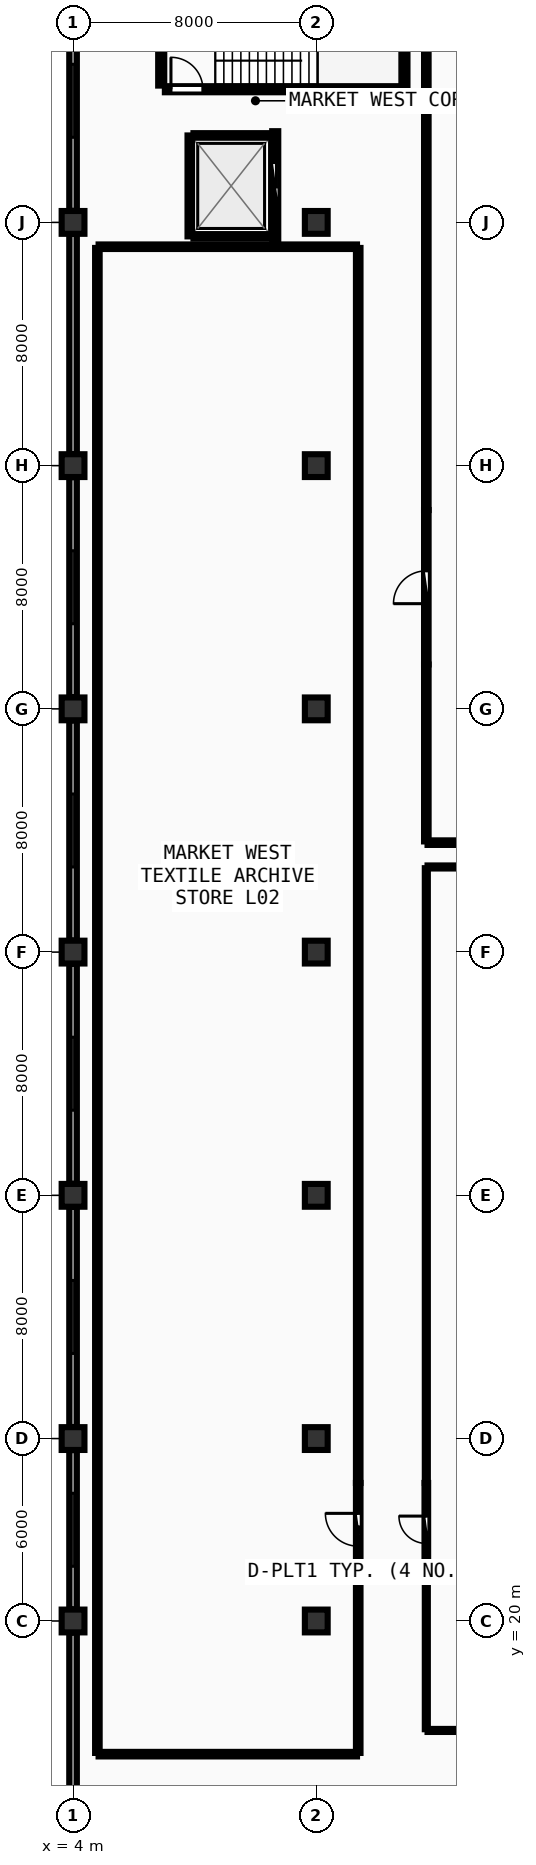
"""IFC4 building model, lengths in metres.
Left out: names, types, materials, properties, quantities, classifications, styles, units other than length and angle.
Written with IfcOpenShell. Run it as: python <this file> out.ifc"""

import sys

from ifc_helpers import new_model, si_unit, direction, frame, frame_2d, origin, origin_2d, place, context, subcontext, project, spatial, rectangle, extrude, element, fill, save


model = new_model("IFC4")
c1 = context("Model", 3, precision=1e-05, world=origin(), true_north=direction((0.0, 1.0)))
c2 = subcontext(c1, "Body", "Model", "MODEL_VIEW")
j1 = project(units=[si_unit("LENGTHUNIT", "METRE"), si_unit("PLANEANGLEUNIT", "RADIAN")], contexts=[c1])
p1 = place(None, origin())
s1 = spatial("IfcSite", under=j1, at=p1, CompositionType="ELEMENT")
p2 = place(p1, origin())
s2 = spatial("IfcBuilding", under=s1, at=p2, CompositionType="ELEMENT")
p3 = place(p2, frame((0.0, 0.0, 9.0)))
s3 = spatial("IfcBuildingStorey", under=s2, at=p3, CompositionType="ELEMENT", Elevation=9.0)
for number, where, z_axis, x_axis in (
    (1, (4.0, 20.0, 0.0), (0.0, 0.0, 1.0), (1.0, 0.0, 0.0)),
    (2, (4.0, 26.0, 0.0), (0.0, 0.0, 1.0), (1.0, 0.0, 0.0)),
    (3, (4.0, 34.0, 0.0), (0.0, 0.0, 1.0), (1.0, 0.0, 0.0)),
    (4, (4.0, 42.0, 0.0), (0.0, 0.0, 1.0), (1.0, 0.0, 0.0)),
    (5, (4.0, 50.0, 0.0), (0.0, 0.0, 1.0), (1.0, 0.0, 0.0)),
    (6, (4.0, 58.0, 0.0), (0.0, 0.0, 1.0), (1.0, 0.0, 0.0)),
    (7, (4.0, 66.0, 0.0), (0.0, 0.0, 1.0), (1.0, 0.0, 0.0)),
    (8, (12.0, 20.0, 0.0), (0.0, 0.0, 1.0), (1.0, 0.0, 0.0)),
    (9, (12.0, 26.0, 0.0), (0.0, 0.0, 1.0), (1.0, 0.0, 0.0)),
    (10, (12.0, 34.0, 0.0), (0.0, 0.0, 1.0), (1.0, 0.0, 0.0)),
    (11, (12.0, 42.0, 0.0), (0.0, 0.0, 1.0), (1.0, 0.0, 0.0)),
    (12, (12.0, 50.0, 0.0), (0.0, 0.0, 1.0), (1.0, 0.0, 0.0)),
    (13, (12.0, 58.0, 0.0), (0.0, 0.0, 1.0), (1.0, 0.0, 0.0)),
    (14, (12.0, 66.0, 0.0), (0.0, 0.0, 1.0), (1.0, 0.0, 0.0)),
):
    element("IfcColumn", number, at=place(p3, frame(where, z_axis=z_axis, x_axis=x_axis)), inside=s3, PredefinedType="COLUMN", context=c2, shape_type="SweptSolid", body=[
        extrude(rectangle(XDim=0.75, YDim=0.75, at=origin_2d()), origin(), (0.0, 0.0, 1.0), 4.5),
    ])
p4 = place(p3, frame((4.0, 73.62, 0.0), z_axis=(0.0, 0.0, 1.0), x_axis=(0.0, -1.0, 0.0)))
e15 = element("IfcWall", 15, at=p4, inside=s3, PredefinedType="SOLIDWALL", context=c2, shape_type="SweptSolid", body=[
    extrude(rectangle(XDim=7.24, YDim=0.25, at=frame_2d((3.62, 0.0))), origin(), (0.0, 0.0, 1.0), 3.42),
])
p5 = place(p4, frame((2.42, 0.0, 0.95)))
e16 = element("IfcOpeningElement", 16, at=p5, cuts=e15, PredefinedType="OPENING", context=c2, shape_type="SweptSolid", body=[
    extrude(rectangle(XDim=2.4, YDim=1.65, at=frame_2d((1.2, 0.825))), frame((0.0, 0.135, 0.0), z_axis=(0.0, -1.0, 0.0), x_axis=(1.0, 0.0, 0.0)), (0.0, 0.0, 1.0), 0.27),
])
p6 = place(p3, frame((4.0, 65.62, 0.0), z_axis=(0.0, 0.0, 1.0), x_axis=(0.0, -1.0, 0.0)))
e17 = element("IfcWall", 17, at=p6, inside=s3, PredefinedType="SOLIDWALL", context=c2, shape_type="SweptSolid", body=[
    extrude(rectangle(XDim=7.24, YDim=0.25, at=frame_2d((3.62, 0.0))), origin(), (0.0, 0.0, 1.0), 3.42),
])
p7 = place(p3, frame((4.0, 57.62, 0.0), z_axis=(0.0, 0.0, 1.0), x_axis=(0.0, -1.0, 0.0)))
e18 = element("IfcWall", 18, at=p7, inside=s3, PredefinedType="SOLIDWALL", context=c2, shape_type="SweptSolid", body=[
    extrude(rectangle(XDim=7.24, YDim=0.25, at=frame_2d((3.62, 0.0))), origin(), (0.0, 0.0, 1.0), 3.42),
])
p8 = place(p7, frame((2.42, 0.0, 0.95)))
e19 = element("IfcOpeningElement", 19, at=p8, cuts=e18, PredefinedType="OPENING", context=c2, shape_type="SweptSolid", body=[
    extrude(rectangle(XDim=2.4, YDim=1.65, at=frame_2d((1.2, 0.825))), frame((0.0, 0.135, 0.0), z_axis=(0.0, -1.0, 0.0), x_axis=(1.0, 0.0, 0.0)), (0.0, 0.0, 1.0), 0.27),
])
p9 = place(p3, frame((4.0, 49.62, 0.0), z_axis=(0.0, 0.0, 1.0), x_axis=(0.0, -1.0, 0.0)))
e20 = element("IfcWall", 20, at=p9, inside=s3, PredefinedType="SOLIDWALL", context=c2, shape_type="SweptSolid", body=[
    extrude(rectangle(XDim=7.24, YDim=0.25, at=frame_2d((3.62, 0.0))), origin(), (0.0, 0.0, 1.0), 3.42),
])
p10 = place(p9, frame((2.42, 0.0, 0.95)))
e21 = element("IfcOpeningElement", 21, at=p10, cuts=e20, PredefinedType="OPENING", context=c2, shape_type="SweptSolid", body=[
    extrude(rectangle(XDim=2.4, YDim=1.65, at=frame_2d((1.2, 0.825))), frame((0.0, 0.135, 0.0), z_axis=(0.0, -1.0, 0.0), x_axis=(1.0, 0.0, 0.0)), (0.0, 0.0, 1.0), 0.27),
])
p11 = place(p3, frame((4.0, 41.62, 0.0), z_axis=(0.0, 0.0, 1.0), x_axis=(0.0, -1.0, 0.0)))
e22 = element("IfcWall", 22, at=p11, inside=s3, PredefinedType="SOLIDWALL", context=c2, shape_type="SweptSolid", body=[
    extrude(rectangle(XDim=7.24, YDim=0.25, at=frame_2d((3.62, 0.0))), origin(), (0.0, 0.0, 1.0), 3.42),
])
p12 = place(p11, frame((2.42, 0.0, 0.95)))
e23 = element("IfcOpeningElement", 23, at=p12, cuts=e22, PredefinedType="OPENING", context=c2, shape_type="SweptSolid", body=[
    extrude(rectangle(XDim=2.4, YDim=1.65, at=frame_2d((1.2, 0.825))), frame((0.0, 0.135, 0.0), z_axis=(0.0, -1.0, 0.0), x_axis=(1.0, 0.0, 0.0)), (0.0, 0.0, 1.0), 0.27),
])
p13 = place(p3, frame((4.0, 33.62, 0.0), z_axis=(0.0, 0.0, 1.0), x_axis=(0.0, -1.0, 0.0)))
e24 = element("IfcWall", 24, at=p13, inside=s3, PredefinedType="SOLIDWALL", context=c2, shape_type="SweptSolid", body=[
    extrude(rectangle(XDim=7.24, YDim=0.25, at=frame_2d((3.62, 0.0))), origin(), (0.0, 0.0, 1.0), 3.42),
])
p14 = place(p13, frame((2.42, 0.0, 0.95)))
e25 = element("IfcOpeningElement", 25, at=p14, cuts=e24, PredefinedType="OPENING", context=c2, shape_type="SweptSolid", body=[
    extrude(rectangle(XDim=2.4, YDim=1.65, at=frame_2d((1.2, 0.825))), frame((0.0, 0.135, 0.0), z_axis=(0.0, -1.0, 0.0), x_axis=(1.0, 0.0, 0.0)), (0.0, 0.0, 1.0), 0.27),
])
p15 = place(p3, frame((4.0, 25.62, 0.0), z_axis=(0.0, 0.0, 1.0), x_axis=(0.0, -1.0, 0.0)))
e26 = element("IfcWall", 26, at=p15, inside=s3, PredefinedType="SOLIDWALL", context=c2, shape_type="SweptSolid", body=[
    extrude(rectangle(XDim=5.24, YDim=0.25, at=frame_2d((2.62, 0.0))), origin(), (0.0, 0.0, 1.0), 3.42),
])
p16 = place(p15, frame((1.42, 0.0, 0.95)))
e27 = element("IfcOpeningElement", 27, at=p16, cuts=e26, PredefinedType="OPENING", context=c2, shape_type="SweptSolid", body=[
    extrude(rectangle(XDim=2.4, YDim=1.65, at=frame_2d((1.2, 0.825))), frame((0.0, 0.135, 0.0), z_axis=(0.0, -1.0, 0.0), x_axis=(1.0, 0.0, 0.0)), (0.0, 0.0, 1.0), 0.27),
])
p17 = place(p3, frame((4.0, 19.62, 0.0), z_axis=(0.0, 0.0, 1.0), x_axis=(0.0, -1.0, 0.0)))
e28 = element("IfcWall", 28, at=p17, inside=s3, PredefinedType="SOLIDWALL", context=c2, shape_type="SweptSolid", body=[
    extrude(rectangle(XDim=7.24, YDim=0.25, at=frame_2d((3.62, 0.0))), origin(), (0.0, 0.0, 1.0), 3.42),
])
p18 = place(p3, frame((7.02, 70.38, 0.0), z_axis=(0.0, 0.0, 1.0), x_axis=(1.0, 0.0, 0.0)))
e29 = element("IfcWall", 29, at=p18, inside=s3, PredefinedType="SHEAR", context=c2, shape_type="SweptSolid", body=[
    extrude(rectangle(XDim=7.76, YDim=0.2, at=frame_2d((3.88, 0.0))), origin(), (0.0, 0.0, 1.0), 4.24),
])
p19 = place(p18, frame((0.2, 0.0, 0.0)))
e30 = element("IfcOpeningElement", 30, at=p19, cuts=e29, PredefinedType="OPENING", context=c2, shape_type="SweptSolid", body=[
    extrude(rectangle(XDim=1.05, YDim=2.1, at=frame_2d((0.525, 1.05))), frame((0.0, 0.11, 0.0), z_axis=(0.0, -1.0, 0.0), x_axis=(1.0, 0.0, 0.0)), (0.0, 0.0, 1.0), 0.22),
])
for number, where, z_axis, x_axis in (
    (31, (14.9, 70.5, 0.0), (0.0, 0.0, 1.0), (0.0, 1.0, 0.0)),
    (32, (6.9, 73.97, 0.0), (0.0, 0.0, 1.0), (0.0, -1.0, 0.0)),
):
    element("IfcWall", number, at=place(p3, frame(where, z_axis=z_axis, x_axis=x_axis)), inside=s3, PredefinedType="SHEAR", context=c2, shape_type="SweptSolid", body=[
        extrude(rectangle(XDim=3.47, YDim=0.2, at=frame_2d((1.735, 0.0))), origin(), (0.0, 0.0, 1.0), 4.24),
    ])
p20 = place(p3, frame((10.65, 65.4, 0.0), z_axis=(0.0, 0.0, 1.0), x_axis=(0.0, 1.0, 0.0)))
e33 = element("IfcWall", 33, at=p20, inside=s3, PredefinedType="SOLIDWALL", context=c2, shape_type="SweptSolid", body=[
    extrude(rectangle(XDim=3.6, YDim=0.2, at=frame_2d((1.8, 0.0))), origin(), (0.0, 0.0, 1.0), 3.425),
])
p21 = place(p20, frame((1.02, 0.0, 0.0)))
e34 = element("IfcOpeningElement", 34, at=p21, cuts=e33, PredefinedType="OPENING", context=c2, shape_type="SweptSolid", body=[
    extrude(rectangle(XDim=1.55, YDim=2.2, at=frame_2d((0.775, 1.1))), frame((0.0, 0.11, 0.0), z_axis=(0.0, -1.0, 0.0), x_axis=(1.0, 0.0, 0.0)), (0.0, 0.0, 1.0), 0.22),
])
p22 = place(p3, frame((7.84, 65.54, 0.0), z_axis=(0.0, 0.0, 1.0), x_axis=(0.0, 1.0, 0.0)))
e35 = element("IfcWall", 35, at=p22, inside=s3, PredefinedType="PARTITIONING", context=c2, shape_type="SweptSolid", body=[
    extrude(rectangle(XDim=3.32, YDim=0.15, at=frame_2d((1.66, 0.0))), origin(), (0.0, 0.0, 1.0), 3.425),
])
for number, where, z_axis, x_axis in (
    (36, (7.96, 65.54, 0.0), (0.0, 0.0, 1.0), (1.0, 0.0, 0.0)),
    (37, (7.96, 68.86, 0.0), (0.0, 0.0, 1.0), (1.0, 0.0, 0.0)),
):
    element("IfcWall", number, at=place(p3, frame(where, z_axis=z_axis, x_axis=x_axis)), inside=s3, PredefinedType="PARTITIONING", context=c2, shape_type="SweptSolid", body=[
        extrude(rectangle(XDim=2.56, YDim=0.15, at=frame_2d((1.28, 0.0))), origin(), (0.0, 0.0, 1.0), 4.23),
    ])
p23 = place(p3, frame((15.62, 21.46, 0.0), z_axis=(0.0, 0.0, 1.0), x_axis=(0.0, 1.0, 0.0)))
e38 = element("IfcWall", 38, at=p23, inside=s3, PredefinedType="PARTITIONING", context=c2, shape_type="SweptSolid", body=[
    extrude(rectangle(XDim=3.08, YDim=0.12, at=frame_2d((1.54, 0.0))), origin(), (0.0, 0.0, 1.0), 4.09),
])
p24 = place(p23, frame((1.09, 0.0, 0.0)))
e39 = element("IfcOpeningElement", 39, at=p24, cuts=e38, PredefinedType="OPENING", context=c2, shape_type="SweptSolid", body=[
    extrude(rectangle(XDim=0.9, YDim=2.08, at=frame_2d((0.45, 1.04))), frame((0.0, 0.07, 0.0), z_axis=(0.0, -1.0, 0.0), x_axis=(1.0, 0.0, 0.0)), (0.0, 0.0, 1.0), 0.14),
])
p25 = place(p3, frame((15.62, 51.46, 0.0), z_axis=(0.0, 0.0, 1.0), x_axis=(0.0, 1.0, 0.0)))
e40 = element("IfcWall", 40, at=p25, inside=s3, PredefinedType="PARTITIONING", context=c2, shape_type="SweptSolid", body=[
    extrude(rectangle(XDim=5.08, YDim=0.15, at=frame_2d((2.54, 0.0))), origin(), (0.0, 0.0, 1.0), 4.09),
])
p26 = place(p25, frame((2.0, 0.0, 0.0)))
e41 = element("IfcOpeningElement", 41, at=p26, cuts=e40, PredefinedType="OPENING", context=c2, shape_type="SweptSolid", body=[
    extrude(rectangle(XDim=1.08, YDim=2.1, at=frame_2d((0.54, 1.05))), frame((0.0, 0.085, 0.0), z_axis=(0.0, -1.0, 0.0), x_axis=(1.0, 0.0, 0.0)), (0.0, 0.0, 1.0), 0.17),
])
p27 = place(p3, frame((13.38, 21.46, 0.0), z_axis=(0.0, 0.0, 1.0), x_axis=(0.0, 1.0, 0.0)))
e42 = element("IfcWall", 42, at=p27, inside=s3, PredefinedType="PARTITIONING", context=c2, shape_type="SweptSolid", body=[
    extrude(rectangle(XDim=3.08, YDim=0.15, at=frame_2d((1.54, 0.0))), origin(), (0.0, 0.0, 1.0), 4.09),
])
p28 = place(p27, frame((1.0, 0.0, 0.0)))
e43 = element("IfcOpeningElement", 43, at=p28, cuts=e42, PredefinedType="OPENING", context=c2, shape_type="SweptSolid", body=[
    extrude(rectangle(XDim=1.08, YDim=2.1, at=frame_2d((0.54, 1.05))), frame((0.0, 0.085, 0.0), z_axis=(0.0, -1.0, 0.0), x_axis=(1.0, 0.0, 0.0)), (0.0, 0.0, 1.0), 0.17),
])
for number, where, z_axis, x_axis in (
    (44, (15.66, 16.4, 0.0), (0.0, 0.0, 1.0), (1.0, 0.0, 0.0)),
    (45, (35.16, 44.8, 0.0), (0.0, 0.0, 1.0), (-1.0, 0.0, 0.0)),
):
    element("IfcWall", number, at=place(p3, frame(where, z_axis=z_axis, x_axis=x_axis)), inside=s3, PredefinedType="PARTITIONING", context=c2, shape_type="SweptSolid", body=[
        extrude(rectangle(XDim=19.5, YDim=0.1, at=frame_2d((9.75, 0.0))), origin(), (0.0, 0.0, 1.0), 3.425),
    ])
p29 = place(p3, frame((15.62, 44.76, 0.0), z_axis=(0.0, 0.0, 1.0), x_axis=(0.0, -1.0, 0.0)))
e46 = element("IfcWall", 46, at=p29, inside=s3, PredefinedType="PARTITIONING", context=c2, shape_type="SweptSolid", body=[
    extrude(rectangle(XDim=20.22, YDim=0.1, at=frame_2d((10.11, 0.0))), origin(), (0.0, 0.0, 1.0), 3.425),
])
p30 = place(p3, frame((15.62, 21.46, 0.0), z_axis=(0.0, 0.0, 1.0), x_axis=(0.0, -1.0, 0.0)))
e47 = element("IfcWall", 47, at=p30, inside=s3, PredefinedType="PARTITIONING", context=c2, shape_type="SweptSolid", body=[
    extrude(rectangle(XDim=5.02, YDim=0.1, at=frame_2d((2.51, 0.0))), origin(), (0.0, 0.0, 1.0), 3.425),
])
p31 = place(p3, frame((15.66, 45.6, 0.0), z_axis=(0.0, 0.0, 1.0), x_axis=(1.0, 0.0, 0.0)))
e48 = element("IfcWall", 48, at=p31, inside=s3, PredefinedType="PARTITIONING", context=c2, shape_type="SweptSolid", body=[
    extrude(rectangle(XDim=19.5, YDim=0.15, at=frame_2d((9.75, 0.0))), origin(), (0.0, 0.0, 1.0), 3.425),
])
p32 = place(p3, frame((15.62, 81.16, 0.0), z_axis=(0.0, 0.0, 1.0), x_axis=(0.0, -1.0, 0.0)))
e49 = element("IfcWall", 49, at=p32, inside=s3, PredefinedType="PARTITIONING", context=c2, shape_type="SweptSolid", body=[
    extrude(rectangle(XDim=24.62, YDim=0.15, at=frame_2d((12.31, 0.0))), origin(), (0.0, 0.0, 1.0), 3.425),
])
p33 = place(p3, frame((15.62, 51.46, 0.0), z_axis=(0.0, 0.0, 1.0), x_axis=(0.0, -1.0, 0.0)))
e50 = element("IfcWall", 50, at=p33, inside=s3, PredefinedType="PARTITIONING", context=c2, shape_type="SweptSolid", body=[
    extrude(rectangle(XDim=5.82, YDim=0.15, at=frame_2d((2.91, 0.0))), origin(), (0.0, 0.0, 1.0), 3.425),
])
p34 = place(p3, frame((4.84, 15.62, 0.0), z_axis=(0.0, 0.0, 1.0), x_axis=(1.0, 0.0, 0.0)))
e51 = element("IfcWall", 51, at=p34, inside=s3, PredefinedType="PARTITIONING", context=c2, shape_type="SweptSolid", body=[
    extrude(rectangle(XDim=8.5, YDim=0.15, at=frame_2d((4.25, 0.0))), origin(), (0.0, 0.0, 1.0), 3.425),
])
p35 = place(p3, frame((13.38, 15.66, 0.0), z_axis=(0.0, 0.0, 1.0), x_axis=(0.0, 1.0, 0.0)))
e52 = element("IfcWall", 52, at=p35, inside=s3, PredefinedType="PARTITIONING", context=c2, shape_type="SweptSolid", body=[
    extrude(rectangle(XDim=5.8, YDim=0.15, at=frame_2d((2.9, 0.0))), origin(), (0.0, 0.0, 1.0), 3.425),
])
p36 = place(p3, frame((13.38, 24.54, 0.0), z_axis=(0.0, 0.0, 1.0), x_axis=(0.0, 1.0, 0.0)))
e53 = element("IfcWall", 53, at=p36, inside=s3, PredefinedType="PARTITIONING", context=c2, shape_type="SweptSolid", body=[
    extrude(rectangle(XDim=40.62, YDim=0.15, at=frame_2d((20.31, 0.0))), origin(), (0.0, 0.0, 1.0), 3.425),
])
p37 = place(p3, frame((13.34, 65.2, 0.0), z_axis=(0.0, 0.0, 1.0), x_axis=(-1.0, 0.0, 0.0)))
e54 = element("IfcWall", 54, at=p37, inside=s3, PredefinedType="PARTITIONING", context=c2, shape_type="SweptSolid", body=[
    extrude(rectangle(XDim=8.5, YDim=0.15, at=frame_2d((4.25, 0.0))), origin(), (0.0, 0.0, 1.0), 3.425),
])
p38 = place(p3, frame((4.8, 65.16, 0.0), z_axis=(0.0, 0.0, 1.0), x_axis=(0.0, -1.0, 0.0)))
e55 = element("IfcWall", 55, at=p38, inside=s3, PredefinedType="PARTITIONING", context=c2, shape_type="SweptSolid", body=[
    extrude(rectangle(XDim=49.5, YDim=0.15, at=frame_2d((24.75, 0.0))), origin(), (0.0, 0.0, 1.0), 3.425),
])
p39 = place(p5, origin())
e56 = element("IfcWindow", 56, at=p39, inside=s3, PartitioningType="SINGLE_PANEL", PredefinedType="WINDOW", context=c2, shape_type="SweptSolid", body=[
    extrude(rectangle(XDim=2.4, YDim=1.65, at=frame_2d((1.2, 0.825))), frame((0.0, 0.03, 0.0), z_axis=(0.0, -1.0, 0.0), x_axis=(1.0, 0.0, 0.0)), (0.0, 0.0, 1.0), 0.06),
])
fill(e16, e56)
p40 = place(p8, origin())
e57 = element("IfcWindow", 57, at=p40, inside=s3, PartitioningType="SINGLE_PANEL", PredefinedType="WINDOW", context=c2, shape_type="SweptSolid", body=[
    extrude(rectangle(XDim=2.4, YDim=1.65, at=frame_2d((1.2, 0.825))), frame((0.0, 0.03, 0.0), z_axis=(0.0, -1.0, 0.0), x_axis=(1.0, 0.0, 0.0)), (0.0, 0.0, 1.0), 0.06),
])
fill(e19, e57)
p41 = place(p10, origin())
e58 = element("IfcWindow", 58, at=p41, inside=s3, PartitioningType="SINGLE_PANEL", PredefinedType="WINDOW", context=c2, shape_type="SweptSolid", body=[
    extrude(rectangle(XDim=2.4, YDim=1.65, at=frame_2d((1.2, 0.825))), frame((0.0, 0.03, 0.0), z_axis=(0.0, -1.0, 0.0), x_axis=(1.0, 0.0, 0.0)), (0.0, 0.0, 1.0), 0.06),
])
fill(e21, e58)
p42 = place(p12, origin())
e59 = element("IfcWindow", 59, at=p42, inside=s3, PartitioningType="SINGLE_PANEL", PredefinedType="WINDOW", context=c2, shape_type="SweptSolid", body=[
    extrude(rectangle(XDim=2.4, YDim=1.65, at=frame_2d((1.2, 0.825))), frame((0.0, 0.03, 0.0), z_axis=(0.0, -1.0, 0.0), x_axis=(1.0, 0.0, 0.0)), (0.0, 0.0, 1.0), 0.06),
])
fill(e23, e59)
p43 = place(p14, origin())
e60 = element("IfcWindow", 60, at=p43, inside=s3, PartitioningType="SINGLE_PANEL", PredefinedType="WINDOW", context=c2, shape_type="SweptSolid", body=[
    extrude(rectangle(XDim=2.4, YDim=1.65, at=frame_2d((1.2, 0.825))), frame((0.0, 0.03, 0.0), z_axis=(0.0, -1.0, 0.0), x_axis=(1.0, 0.0, 0.0)), (0.0, 0.0, 1.0), 0.06),
])
fill(e25, e60)
p44 = place(p16, origin())
e61 = element("IfcWindow", 61, at=p44, inside=s3, PartitioningType="SINGLE_PANEL", PredefinedType="WINDOW", context=c2, shape_type="SweptSolid", body=[
    extrude(rectangle(XDim=2.4, YDim=1.65, at=frame_2d((1.2, 0.825))), frame((0.0, 0.03, 0.0), z_axis=(0.0, -1.0, 0.0), x_axis=(1.0, 0.0, 0.0)), (0.0, 0.0, 1.0), 0.06),
])
fill(e27, e61)
p45 = place(p19, origin())
e62 = element("IfcDoor", 62, at=p45, inside=s3, OperationType="SINGLE_SWING_LEFT", PredefinedType="DOOR", context=c2, shape_type="SweptSolid", body=[
    extrude(rectangle(XDim=1.05, YDim=2.1, at=frame_2d((0.525, 1.05))), frame((0.0, 0.025, 0.0), z_axis=(0.0, -1.0, 0.0), x_axis=(1.0, 0.0, 0.0)), (0.0, 0.0, 1.0), 0.05),
])
fill(e30, e62)
p46 = place(p21, origin())
e63 = element("IfcDoor", 63, at=p46, inside=s3, OperationType="DOUBLE_DOOR_SLIDING", PredefinedType="DOOR", context=c2, shape_type="SweptSolid", body=[
    extrude(rectangle(XDim=1.55, YDim=2.2, at=frame_2d((0.775, 1.1))), frame((0.0, 0.025, 0.0), z_axis=(0.0, -1.0, 0.0), x_axis=(1.0, 0.0, 0.0)), (0.0, 0.0, 1.0), 0.05),
])
fill(e34, e63)
p47 = place(p24, origin())
e64 = element("IfcDoor", 64, at=p47, inside=s3, OperationType="SINGLE_SWING_RIGHT", PredefinedType="DOOR", context=c2, shape_type="SweptSolid", body=[
    extrude(rectangle(XDim=0.9, YDim=2.08, at=frame_2d((0.45, 1.04))), frame((0.0, 0.025, 0.0), z_axis=(0.0, -1.0, 0.0), x_axis=(1.0, 0.0, 0.0)), (0.0, 0.0, 1.0), 0.05),
])
fill(e39, e64)
p48 = place(p26, origin())
e65 = element("IfcDoor", 65, at=p48, inside=s3, OperationType="SINGLE_SWING_LEFT", PredefinedType="DOOR", context=c2, shape_type="SweptSolid", body=[
    extrude(rectangle(XDim=1.08, YDim=2.1, at=frame_2d((0.54, 1.05))), frame((0.0, 0.025, 0.0), z_axis=(0.0, -1.0, 0.0), x_axis=(1.0, 0.0, 0.0)), (0.0, 0.0, 1.0), 0.05),
])
fill(e41, e65)
p49 = place(p28, origin())
e66 = element("IfcDoor", 66, at=p49, inside=s3, OperationType="SINGLE_SWING_RIGHT", PredefinedType="DOOR", context=c2, shape_type="SweptSolid", body=[
    extrude(rectangle(XDim=1.08, YDim=2.1, at=frame_2d((0.54, 1.05))), frame((0.0, 0.025, 0.0), z_axis=(0.0, -1.0, 0.0), x_axis=(1.0, 0.0, 0.0)), (0.0, 0.0, 1.0), 0.05),
])
fill(e43, e66)
save(model, sys.argv[1])
